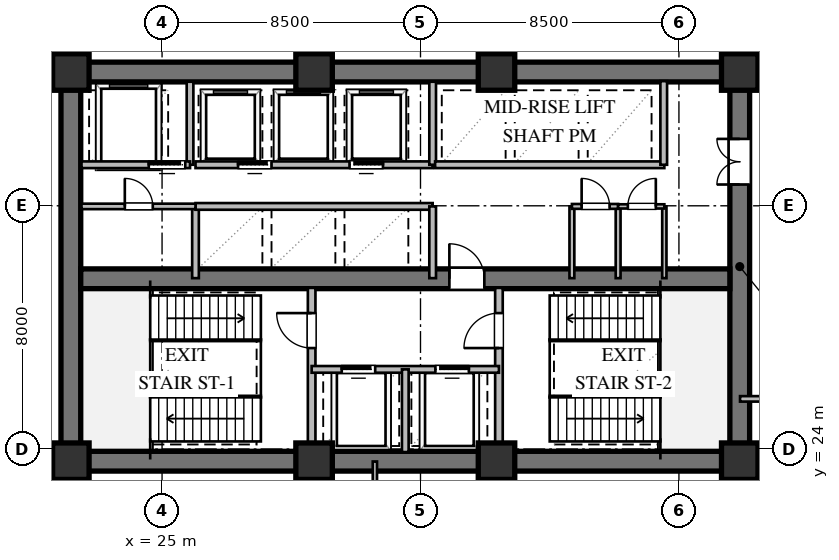
"""IFC4 building model, lengths in metres.
Left out: names, types, materials, properties, quantities, classifications, styles, units other than length and angle.
Written with IfcOpenShell. Run it as: python <this file> out.ifc"""

import sys

from ifc_helpers import new_model, si_unit, direction, frame, frame_2d, origin, origin_2d, place, context, subcontext, project, spatial, rectangle, extrude, element, fill, save


model = new_model("IFC4")
c1 = context("Model", 3, precision=1e-05, world=origin(), true_north=direction((0.0, 1.0)))
c2 = subcontext(c1, "Body", "Model", "MODEL_VIEW")
j1 = project(units=[si_unit("LENGTHUNIT", "METRE"), si_unit("PLANEANGLEUNIT", "RADIAN")], contexts=[c1])
p1 = place(None, origin())
s1 = spatial("IfcSite", under=j1, at=p1, CompositionType="ELEMENT")
p2 = place(p1, origin())
s2 = spatial("IfcBuilding", under=s1, at=p2, CompositionType="ELEMENT")
p3 = place(p2, frame((0.0, 0.0, 4.8)))
s3 = spatial("IfcBuildingStorey", under=s2, at=p3, CompositionType="ELEMENT", Elevation=4.8)
for number, where, z_axis, x_axis in (
    (1, (21.675, 23.6, 0.0), (0.0, 0.0, 1.0), (1.0, 0.0, 0.0)),
    (2, (21.675, 36.4, 0.0), (0.0, 0.0, 1.0), (1.0, 0.0, 0.0)),
):
    element("IfcWall", number, at=place(p3, frame(where, z_axis=z_axis, x_axis=x_axis)), inside=s3, PredefinedType="SHEAR", context=c2, shape_type="SweptSolid", body=[
        extrude(rectangle(XDim=22.65, YDim=0.65, at=frame_2d((11.325, 0.0))), origin(), (0.0, 0.0, 1.0), 4.52),
    ])
p4 = place(p3, frame((22.0, 23.925, 0.0), z_axis=(0.0, 0.0, 1.0), x_axis=(0.0, 1.0, 0.0)))
e3 = element("IfcWall", 3, at=p4, inside=s3, PredefinedType="SHEAR", context=c2, shape_type="SweptSolid", body=[
    extrude(rectangle(XDim=12.15, YDim=0.65, at=frame_2d((6.075, 0.0))), origin(), (0.0, 0.0, 1.0), 4.52),
])
p5 = place(p3, frame((44.0, 23.925, 0.0), z_axis=(0.0, 0.0, 1.0), x_axis=(0.0, 1.0, 0.0)))
e4 = element("IfcWall", 4, at=p5, inside=s3, PredefinedType="SHEAR", context=c2, shape_type="SweptSolid", body=[
    extrude(rectangle(XDim=12.15, YDim=0.65, at=frame_2d((6.075, 0.0))), origin(), (0.0, 0.0, 1.0), 4.52),
])
p6 = place(p5, frame((8.775, 0.0, 0.0)))
e5 = element("IfcOpeningElement", 5, at=p6, cuts=e4, PredefinedType="OPENING", context=c2, shape_type="SweptSolid", body=[
    extrude(rectangle(XDim=1.5, YDim=2.15, at=frame_2d((0.75, 1.075))), frame((0.0, 0.335, 0.0), z_axis=(0.0, -1.0, 0.0), x_axis=(1.0, 0.0, 0.0)), (0.0, 0.0, 1.0), 0.67),
])
p7 = place(p3, frame((22.325, 29.6, 0.0), z_axis=(0.0, 0.0, 1.0), x_axis=(1.0, 0.0, 0.0)))
e6 = element("IfcWall", 6, at=p7, inside=s3, PredefinedType="SHEAR", context=c2, shape_type="SweptSolid", body=[
    extrude(rectangle(XDim=21.35, YDim=0.65, at=frame_2d((10.675, 0.0))), origin(), (0.0, 0.0, 1.0), 4.52),
])
p8 = place(p7, frame((12.125, 0.0, 0.0)))
e7 = element("IfcOpeningElement", 7, at=p8, cuts=e6, PredefinedType="OPENING", context=c2, shape_type="SweptSolid", body=[
    extrude(rectangle(XDim=1.15, YDim=2.1, at=frame_2d((0.575, 1.05))), frame((0.0, 0.335, 0.0), z_axis=(0.0, -1.0, 0.0), x_axis=(1.0, 0.0, 0.0)), (0.0, 0.0, 1.0), 0.67),
])
for number, where, z_axis, x_axis in (
    (8, (22.0, 23.6, 0.0), (0.0, 0.0, 1.0), (1.0, 0.0, 0.0)),
    (9, (30.0, 23.6, 0.0), (0.0, 0.0, 1.0), (1.0, 0.0, 0.0)),
    (10, (36.0, 23.6, 0.0), (0.0, 0.0, 1.0), (1.0, 0.0, 0.0)),
    (11, (44.0, 23.6, 0.0), (0.0, 0.0, 1.0), (1.0, 0.0, 0.0)),
    (12, (44.0, 36.4, 0.0), (0.0, 0.0, 1.0), (1.0, 0.0, 0.0)),
    (13, (36.0, 36.4, 0.0), (0.0, 0.0, 1.0), (1.0, 0.0, 0.0)),
    (14, (30.0, 36.4, 0.0), (0.0, 0.0, 1.0), (1.0, 0.0, 0.0)),
    (15, (22.0, 36.4, 0.0), (0.0, 0.0, 1.0), (1.0, 0.0, 0.0)),
):
    element("IfcColumn", number, at=place(p3, frame(where, z_axis=z_axis, x_axis=x_axis)), inside=s3, PredefinedType="COLUMN", context=c2, shape_type="SweptSolid", body=[
        extrude(rectangle(XDim=1.2, YDim=1.2, at=origin_2d()), origin(), (0.0, 0.0, 1.0), 4.8),
    ])
p9 = place(p3, frame((29.92, 23.9, 0.0), z_axis=(0.0, 0.0, 1.0), x_axis=(0.0, 1.0, 0.0)))
e16 = element("IfcWall", 16, at=p9, inside=s3, PredefinedType="SOLIDWALL", context=c2, shape_type="SweptSolid", body=[
    extrude(rectangle(XDim=5.4, YDim=0.25, at=frame_2d((2.7, 0.0))), origin(), (0.0, 0.0, 1.0), 4.52),
])
p10 = place(p9, frame((3.421, 0.0, 0.0)))
e17 = element("IfcOpeningElement", 17, at=p10, cuts=e16, PredefinedType="OPENING", context=c2, shape_type="SweptSolid", body=[
    extrude(rectangle(XDim=1.15, YDim=2.1, at=frame_2d((0.575, 1.05))), frame((0.0, 0.135, 0.0), z_axis=(0.0, -1.0, 0.0), x_axis=(1.0, 0.0, 0.0)), (0.0, 0.0, 1.0), 0.27),
])
p11 = place(p3, frame((36.08, 23.9, 0.0), z_axis=(0.0, 0.0, 1.0), x_axis=(0.0, 1.0, 0.0)))
e18 = element("IfcWall", 18, at=p11, inside=s3, PredefinedType="SOLIDWALL", context=c2, shape_type="SweptSolid", body=[
    extrude(rectangle(XDim=5.4, YDim=0.25, at=frame_2d((2.7, 0.0))), origin(), (0.0, 0.0, 1.0), 4.52),
])
p12 = place(p11, frame((3.421, 0.0, 0.0)))
e19 = element("IfcOpeningElement", 19, at=p12, cuts=e18, PredefinedType="OPENING", context=c2, shape_type="SweptSolid", body=[
    extrude(rectangle(XDim=1.15, YDim=2.1, at=frame_2d((0.575, 1.05))), frame((0.0, 0.135, 0.0), z_axis=(0.0, -1.0, 0.0), x_axis=(1.0, 0.0, 0.0)), (0.0, 0.0, 1.0), 0.27),
])
p13 = place(p3, frame((29.92, 26.62, 0.0), z_axis=(0.0, 0.0, 1.0), x_axis=(1.0, 0.0, 0.0)))
e20 = element("IfcWall", 20, at=p13, inside=s3, PredefinedType="SOLIDWALL", context=c2, shape_type="SweptSolid", body=[
    extrude(rectangle(XDim=6.16, YDim=0.22, at=frame_2d((3.08, 0.0))), origin(), (0.0, 0.0, 1.0), 4.52),
])
p14 = place(p13, frame((0.99, 0.0, 0.0)))
e21 = element("IfcOpeningElement", 21, at=p14, cuts=e20, PredefinedType="OPENING", context=c2, shape_type="SweptSolid", body=[
    extrude(rectangle(XDim=1.1, YDim=2.1, at=frame_2d((0.55, 1.05))), frame((0.0, 0.12, 0.0), z_axis=(0.0, -1.0, 0.0), x_axis=(1.0, 0.0, 0.0)), (0.0, 0.0, 1.0), 0.24),
])
p15 = place(p13, frame((4.07, 0.0, 0.0)))
e22 = element("IfcOpeningElement", 22, at=p15, cuts=e20, PredefinedType="OPENING", context=c2, shape_type="SweptSolid", body=[
    extrude(rectangle(XDim=1.1, YDim=2.1, at=frame_2d((0.55, 1.05))), frame((0.0, 0.12, 0.0), z_axis=(0.0, -1.0, 0.0), x_axis=(1.0, 0.0, 0.0)), (0.0, 0.0, 1.0), 0.24),
])
p16 = place(p3, frame((33.0, 23.9, 0.0), z_axis=(0.0, 0.0, 1.0), x_axis=(0.0, 1.0, 0.0)))
e23 = element("IfcWall", 23, at=p16, inside=s3, PredefinedType="SOLIDWALL", context=c2, shape_type="SweptSolid", body=[
    extrude(rectangle(XDim=2.72, YDim=0.22, at=frame_2d((1.36, 0.0))), origin(), (0.0, 0.0, 1.0), 4.52),
])
p17 = place(p3, frame((25.92, 33.35, 0.0), z_axis=(0.0, 0.0, 1.0), x_axis=(0.0, 1.0, 0.0)))
e24 = element("IfcWall", 24, at=p17, inside=s3, PredefinedType="SOLIDWALL", context=c2, shape_type="SweptSolid", body=[
    extrude(rectangle(XDim=2.73, YDim=0.22, at=frame_2d((1.365, 0.0))), origin(), (0.0, 0.0, 1.0), 4.52),
])
p18 = place(p3, frame((22.35, 33.35, 0.0), z_axis=(0.0, 0.0, 1.0), x_axis=(1.0, 0.0, 0.0)))
e25 = element("IfcWall", 25, at=p18, inside=s3, PredefinedType="SOLIDWALL", context=c2, shape_type="SweptSolid", body=[
    extrude(rectangle(XDim=3.57, YDim=0.22, at=frame_2d((1.785, 0.0))), origin(), (0.0, 0.0, 1.0), 4.52),
])
p19 = place(p18, frame((2.213, 0.0, 0.0)))
e26 = element("IfcOpeningElement", 26, at=p19, cuts=e25, PredefinedType="OPENING", context=c2, shape_type="SweptSolid", body=[
    extrude(rectangle(XDim=1.2, YDim=2.1, at=frame_2d((0.6, 1.05))), frame((0.0, 0.12, 0.0), z_axis=(0.0, -1.0, 0.0), x_axis=(1.0, 0.0, 0.0)), (0.0, 0.0, 1.0), 0.24),
])
p20 = place(p3, frame((26.1, 29.62, 0.0), z_axis=(0.0, 0.0, 1.0), x_axis=(0.0, 1.0, 0.0)))
e27 = element("IfcWall", 27, at=p20, inside=s3, PredefinedType="SOLIDWALL", context=c2, shape_type="SweptSolid", body=[
    extrude(rectangle(XDim=2.36, YDim=0.22, at=frame_2d((1.18, 0.0))), origin(), (0.0, 0.0, 1.0), 4.52),
])
p21 = place(p3, frame((26.1, 31.98, 0.0), z_axis=(0.0, 0.0, 1.0), x_axis=(1.0, 0.0, 0.0)))
e28 = element("IfcWall", 28, at=p21, inside=s3, PredefinedType="SOLIDWALL", context=c2, shape_type="SweptSolid", body=[
    extrude(rectangle(XDim=7.8, YDim=0.22, at=frame_2d((3.9, 0.0))), origin(), (0.0, 0.0, 1.0), 4.52),
])
p22 = place(p3, frame((33.9, 29.62, 0.0), z_axis=(0.0, 0.0, 1.0), x_axis=(0.0, 1.0, 0.0)))
e29 = element("IfcWall", 29, at=p22, inside=s3, PredefinedType="SOLIDWALL", context=c2, shape_type="SweptSolid", body=[
    extrude(rectangle(XDim=2.36, YDim=0.22, at=frame_2d((1.18, 0.0))), origin(), (0.0, 0.0, 1.0), 4.52),
])
p23 = place(p3, frame((26.1, 33.35, 0.0), z_axis=(0.0, 0.0, 1.0), x_axis=(1.0, 0.0, 0.0)))
e30 = element("IfcWall", 30, at=p23, inside=s3, PredefinedType="SOLIDWALL", context=c2, shape_type="SweptSolid", body=[
    extrude(rectangle(XDim=7.8, YDim=0.22, at=frame_2d((3.9, 0.0))), origin(), (0.0, 0.0, 1.0), 4.52),
])
p24 = place(p23, frame((1.4, 0.0, 0.0)))
e31 = element("IfcOpeningElement", 31, at=p24, cuts=e30, PredefinedType="OPENING", context=c2, shape_type="SweptSolid", body=[
    extrude(rectangle(XDim=1.1, YDim=2.1, at=frame_2d((0.55, 1.05))), frame((0.0, 0.12, 0.0), z_axis=(0.0, -1.0, 0.0), x_axis=(1.0, 0.0, 0.0)), (0.0, 0.0, 1.0), 0.24),
])
p25 = place(p23, frame((5.066, 0.0, 0.0)))
e32 = element("IfcOpeningElement", 32, at=p25, cuts=e30, PredefinedType="OPENING", context=c2, shape_type="SweptSolid", body=[
    extrude(rectangle(XDim=1.1, YDim=2.1, at=frame_2d((0.55, 1.05))), frame((0.0, 0.12, 0.0), z_axis=(0.0, -1.0, 0.0), x_axis=(1.0, 0.0, 0.0)), (0.0, 0.0, 1.0), 0.24),
])
p26 = place(p3, frame((33.9, 33.35, 0.0), z_axis=(0.0, 0.0, 1.0), x_axis=(0.0, 1.0, 0.0)))
e33 = element("IfcWall", 33, at=p26, inside=s3, PredefinedType="SOLIDWALL", context=c2, shape_type="SweptSolid", body=[
    extrude(rectangle(XDim=2.73, YDim=0.22, at=frame_2d((1.365, 0.0))), origin(), (0.0, 0.0, 1.0), 4.52),
])
p27 = place(p3, frame((33.98, 33.35, 0.0), z_axis=(0.0, 0.0, 1.0), x_axis=(1.0, 0.0, 0.0)))
e34 = element("IfcWall", 34, at=p27, inside=s3, PredefinedType="SOLIDWALL", context=c2, shape_type="SweptSolid", body=[
    extrude(rectangle(XDim=7.54, YDim=0.22, at=frame_2d((3.77, 0.0))), origin(), (0.0, 0.0, 1.0), 4.52),
])
p28 = place(p3, frame((41.5, 33.35, 0.0), z_axis=(0.0, 0.0, 1.0), x_axis=(0.0, 1.0, 0.0)))
e35 = element("IfcWall", 35, at=p28, inside=s3, PredefinedType="SOLIDWALL", context=c2, shape_type="SweptSolid", body=[
    extrude(rectangle(XDim=2.75, YDim=0.22, at=frame_2d((1.375, 0.0))), origin(), (0.0, 0.0, 1.0), 4.52),
])
p29 = place(p3, frame((22.35, 31.98, 0.0), z_axis=(0.0, 0.0, 1.0), x_axis=(1.0, 0.0, 0.0)))
e36 = element("IfcWall", 36, at=p29, inside=s3, PredefinedType="PARTITIONING", context=c2, shape_type="SweptSolid", body=[
    extrude(rectangle(XDim=3.75, YDim=0.18, at=frame_2d((1.875, 0.0))), origin(), (0.0, 0.0, 1.0), 4.52),
])
p30 = place(p29, frame((1.425, 0.0, 0.0)))
e37 = element("IfcOpeningElement", 37, at=p30, cuts=e36, PredefinedType="OPENING", context=c2, shape_type="SweptSolid", body=[
    extrude(rectangle(XDim=0.92, YDim=2.1, at=frame_2d((0.46, 1.05))), frame((0.0, 0.1, 0.0), z_axis=(0.0, -1.0, 0.0), x_axis=(1.0, 0.0, 0.0)), (0.0, 0.0, 1.0), 0.2),
])
for number, where, z_axis, x_axis in (
    (38, (38.48, 29.62, 0.0), (0.0, 0.0, 1.0), (0.0, 1.0, 0.0)),
    (39, (40.0, 29.62, 0.0), (0.0, 0.0, 1.0), (0.0, 1.0, 0.0)),
):
    element("IfcWall", number, at=place(p3, frame(where, z_axis=z_axis, x_axis=x_axis)), inside=s3, PredefinedType="PLUMBINGWALL", context=c2, shape_type="SweptSolid", body=[
        extrude(rectangle(XDim=2.36, YDim=0.16, at=frame_2d((1.18, 0.0))), origin(), (0.0, 0.0, 1.0), 4.52),
    ])
p31 = place(p3, frame((41.52, 29.62, 0.0), z_axis=(0.0, 0.0, 1.0), x_axis=(0.0, 1.0, 0.0)))
e40 = element("IfcWall", 40, at=p31, inside=s3, PredefinedType="PARTITIONING", context=c2, shape_type="SweptSolid", body=[
    extrude(rectangle(XDim=2.36, YDim=0.14, at=frame_2d((1.18, 0.0))), origin(), (0.0, 0.0, 1.0), 1.887),
])
p32 = place(p3, frame((38.48, 31.98, 0.0), z_axis=(0.0, 0.0, 1.0), x_axis=(1.0, 0.0, 0.0)))
e41 = element("IfcWall", 41, at=p32, inside=s3, PredefinedType="PLUMBINGWALL", context=c2, shape_type="SweptSolid", body=[
    extrude(rectangle(XDim=1.52, YDim=0.16, at=frame_2d((0.76, 0.0))), origin(), (0.0, 0.0, 1.0), 4.52),
])
p33 = place(p32, frame((0.32, 0.0, 0.0)))
e42 = element("IfcOpeningElement", 42, at=p33, cuts=e41, PredefinedType="OPENING", context=c2, shape_type="SweptSolid", body=[
    extrude(rectangle(XDim=0.92, YDim=2.1, at=frame_2d((0.46, 1.05))), frame((0.0, 0.09, 0.0), z_axis=(0.0, -1.0, 0.0), x_axis=(1.0, 0.0, 0.0)), (0.0, 0.0, 1.0), 0.18),
])
p34 = place(p3, frame((40.0, 31.98, 0.0), z_axis=(0.0, 0.0, 1.0), x_axis=(1.0, 0.0, 0.0)))
e43 = element("IfcWall", 43, at=p34, inside=s3, PredefinedType="PARTITIONING", context=c2, shape_type="SweptSolid", body=[
    extrude(rectangle(XDim=1.52, YDim=0.14, at=frame_2d((0.76, 0.0))), origin(), (0.0, 0.0, 1.0), 4.52),
])
p35 = place(p34, frame((0.32, 0.0, 0.0)))
e44 = element("IfcOpeningElement", 44, at=p35, cuts=e43, PredefinedType="OPENING", context=c2, shape_type="SweptSolid", body=[
    extrude(rectangle(XDim=0.92, YDim=2.1, at=frame_2d((0.46, 1.05))), frame((0.0, 0.08, 0.0), z_axis=(0.0, -1.0, 0.0), x_axis=(1.0, 0.0, 0.0)), (0.0, 0.0, 1.0), 0.16),
])
p36 = place(p3, frame((62.415, 25.65, 0.0), z_axis=(0.0, 0.0, 1.0), x_axis=(-1.0, 0.0, 0.0)))
e45 = element("IfcWall", 45, at=p36, inside=s3, PredefinedType="PARTITIONING", context=c2, shape_type="SweptSolid", body=[
    extrude(rectangle(XDim=18.405, YDim=0.18, at=frame_2d((9.203, 0.0))), origin(), (0.0, 0.0, 1.0), 4.05),
])
p37 = place(p36, frame((8.46, 0.0, 0.0)))
e46 = element("IfcOpeningElement", 46, at=p37, cuts=e45, PredefinedType="OPENING", context=c2, shape_type="SweptSolid", body=[
    extrude(rectangle(XDim=1.2, YDim=2.15, at=frame_2d((0.6, 1.075))), frame((0.0, 0.1, 0.0), z_axis=(0.0, -1.0, 0.0), x_axis=(1.0, 0.0, 0.0)), (0.0, 0.0, 1.0), 0.2),
])
p38 = place(p3, frame((21.675, 23.59, 0.0), z_axis=(0.0, 0.0, 1.0), x_axis=(0.0, -1.0, 0.0)))
e47 = element("IfcWall", 47, at=p38, inside=s3, PredefinedType="PARTITIONING", context=c2, shape_type="SweptSolid", body=[
    extrude(rectangle(XDim=3.62, YDim=0.18, at=frame_2d((1.81, 0.0))), origin(), (0.0, 0.0, 1.0), 3.66),
])
p39 = place(p3, frame((44.325, 5.272, 0.0), z_axis=(0.0, 0.0, 1.0), x_axis=(0.0, 1.0, 0.0)))
e48 = element("IfcWall", 48, at=p39, inside=s3, PredefinedType="PARTITIONING", context=c2, shape_type="SweptSolid", body=[
    extrude(rectangle(XDim=18.318, YDim=0.14, at=frame_2d((9.159, 0.0))), origin(), (0.0, 0.0, 1.0), 3.66),
])
p40 = place(p39, frame((8.349, 0.0, 0.0)))
e49 = element("IfcOpeningElement", 49, at=p40, cuts=e48, PredefinedType="OPENING", context=c2, shape_type="SweptSolid", body=[
    extrude(rectangle(XDim=1.2, YDim=2.15, at=frame_2d((0.6, 1.075))), frame((0.0, 0.08, 0.0), z_axis=(0.0, -1.0, 0.0), x_axis=(1.0, 0.0, 0.0)), (0.0, 0.0, 1.0), 0.16),
])
p41 = place(p3, frame((32.0, 23.59, 0.0), z_axis=(0.0, 0.0, 1.0), x_axis=(0.0, -1.0, 0.0)))
e50 = element("IfcWall", 50, at=p41, inside=s3, PredefinedType="PARTITIONING", context=c2, shape_type="SweptSolid", body=[
    extrude(rectangle(XDim=16.944, YDim=0.14, at=frame_2d((8.472, 0.0))), origin(), (0.0, 0.0, 1.0), 4.52),
])
p42 = place(p10, origin())
e51 = element("IfcDoor", 51, at=p42, inside=s3, OperationType="SINGLE_SWING_RIGHT", PredefinedType="DOOR", context=c2, shape_type="SweptSolid", body=[
    extrude(rectangle(XDim=1.15, YDim=2.1, at=frame_2d((0.575, 1.05))), frame((0.0, 0.025, 0.0), z_axis=(0.0, -1.0, 0.0), x_axis=(1.0, 0.0, 0.0)), (0.0, 0.0, 1.0), 0.05),
])
fill(e17, e51)
p43 = place(p12, origin())
e52 = element("IfcDoor", 52, at=p43, inside=s3, OperationType="SINGLE_SWING_LEFT", PredefinedType="DOOR", context=c2, shape_type="SweptSolid", body=[
    extrude(rectangle(XDim=1.15, YDim=2.1, at=frame_2d((0.575, 1.05))), frame((0.0, 0.025, 0.0), z_axis=(0.0, -1.0, 0.0), x_axis=(1.0, 0.0, 0.0)), (0.0, 0.0, 1.0), 0.05),
])
fill(e19, e52)
p44 = place(p14, origin())
e53 = element("IfcDoor", 53, at=p44, inside=s3, OperationType="SLIDING_TO_LEFT", PredefinedType="DOOR", context=c2, shape_type="SweptSolid", body=[
    extrude(rectangle(XDim=1.1, YDim=2.1, at=frame_2d((0.55, 1.05))), frame((0.0, 0.025, 0.0), z_axis=(0.0, -1.0, 0.0), x_axis=(1.0, 0.0, 0.0)), (0.0, 0.0, 1.0), 0.05),
])
fill(e21, e53)
p45 = place(p15, origin())
e54 = element("IfcDoor", 54, at=p45, inside=s3, OperationType="SLIDING_TO_RIGHT", PredefinedType="DOOR", context=c2, shape_type="SweptSolid", body=[
    extrude(rectangle(XDim=1.1, YDim=2.1, at=frame_2d((0.55, 1.05))), frame((0.0, 0.025, 0.0), z_axis=(0.0, -1.0, 0.0), x_axis=(1.0, 0.0, 0.0)), (0.0, 0.0, 1.0), 0.05),
])
fill(e22, e54)
p46 = place(p8, origin())
e55 = element("IfcDoor", 55, at=p46, inside=s3, OperationType="SINGLE_SWING_LEFT", PredefinedType="DOOR", context=c2, shape_type="SweptSolid", body=[
    extrude(rectangle(XDim=1.15, YDim=2.1, at=frame_2d((0.575, 1.05))), frame((0.0, 0.025, 0.0), z_axis=(0.0, -1.0, 0.0), x_axis=(1.0, 0.0, 0.0)), (0.0, 0.0, 1.0), 0.05),
])
fill(e7, e55)
p47 = place(p6, origin())
e56 = element("IfcDoor", 56, at=p47, inside=s3, OperationType="DOUBLE_DOOR_SINGLE_SWING", PredefinedType="DOOR", context=c2, shape_type="SweptSolid", body=[
    extrude(rectangle(XDim=1.5, YDim=2.15, at=frame_2d((0.75, 1.075))), frame((0.0, 0.025, 0.0), z_axis=(0.0, -1.0, 0.0), x_axis=(1.0, 0.0, 0.0)), (0.0, 0.0, 1.0), 0.05),
])
fill(e5, e56)
p48 = place(p19, origin())
e57 = element("IfcDoor", 57, at=p48, inside=s3, OperationType="SLIDING_TO_LEFT", PredefinedType="DOOR", context=c2, shape_type="SweptSolid", body=[
    extrude(rectangle(XDim=1.2, YDim=2.1, at=frame_2d((0.6, 1.05))), frame((0.0, 0.025, 0.0), z_axis=(0.0, -1.0, 0.0), x_axis=(1.0, 0.0, 0.0)), (0.0, 0.0, 1.0), 0.05),
])
fill(e26, e57)
p49 = place(p24, origin())
e58 = element("IfcDoor", 58, at=p49, inside=s3, OperationType="SLIDING_TO_LEFT", PredefinedType="DOOR", context=c2, shape_type="SweptSolid", body=[
    extrude(rectangle(XDim=1.1, YDim=2.1, at=frame_2d((0.55, 1.05))), frame((0.0, 0.025, 0.0), z_axis=(0.0, -1.0, 0.0), x_axis=(1.0, 0.0, 0.0)), (0.0, 0.0, 1.0), 0.05),
])
fill(e31, e58)
p50 = place(p25, origin())
e59 = element("IfcDoor", 59, at=p50, inside=s3, OperationType="SLIDING_TO_RIGHT", PredefinedType="DOOR", context=c2, shape_type="SweptSolid", body=[
    extrude(rectangle(XDim=1.1, YDim=2.1, at=frame_2d((0.55, 1.05))), frame((0.0, 0.025, 0.0), z_axis=(0.0, -1.0, 0.0), x_axis=(1.0, 0.0, 0.0)), (0.0, 0.0, 1.0), 0.05),
])
fill(e32, e59)
p51 = place(p30, origin())
e60 = element("IfcDoor", 60, at=p51, inside=s3, OperationType="SINGLE_SWING_LEFT", PredefinedType="DOOR", context=c2, shape_type="SweptSolid", body=[
    extrude(rectangle(XDim=0.92, YDim=2.1, at=frame_2d((0.46, 1.05))), frame((0.0, 0.025, 0.0), z_axis=(0.0, -1.0, 0.0), x_axis=(1.0, 0.0, 0.0)), (0.0, 0.0, 1.0), 0.05),
])
fill(e37, e60)
p52 = place(p33, origin())
e61 = element("IfcDoor", 61, at=p52, inside=s3, OperationType="SINGLE_SWING_LEFT", PredefinedType="DOOR", context=c2, shape_type="SweptSolid", body=[
    extrude(rectangle(XDim=0.92, YDim=2.1, at=frame_2d((0.46, 1.05))), frame((0.0, 0.025, 0.0), z_axis=(0.0, -1.0, 0.0), x_axis=(1.0, 0.0, 0.0)), (0.0, 0.0, 1.0), 0.05),
])
fill(e42, e61)
p53 = place(p35, origin())
e62 = element("IfcDoor", 62, at=p53, inside=s3, OperationType="SINGLE_SWING_RIGHT", PredefinedType="DOOR", context=c2, shape_type="SweptSolid", body=[
    extrude(rectangle(XDim=0.92, YDim=2.1, at=frame_2d((0.46, 1.05))), frame((0.0, 0.025, 0.0), z_axis=(0.0, -1.0, 0.0), x_axis=(1.0, 0.0, 0.0)), (0.0, 0.0, 1.0), 0.05),
])
fill(e44, e62)
save(model, sys.argv[1])
